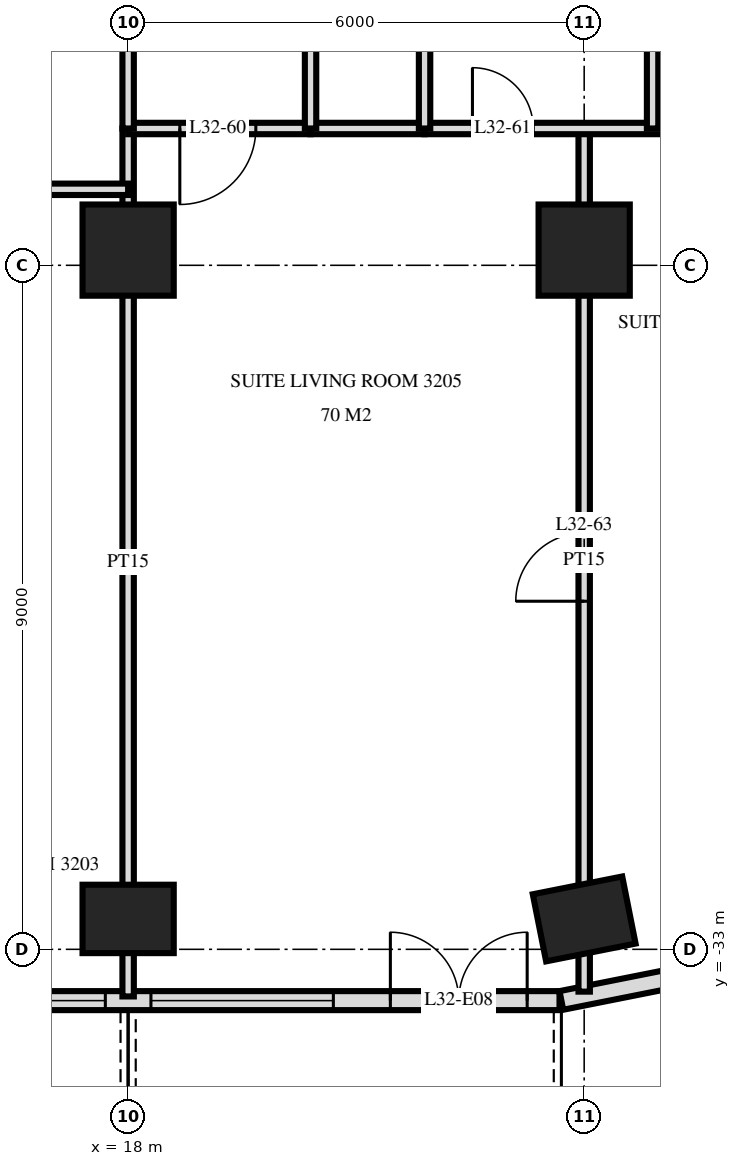
"""IFC4 building model, lengths in metres.
Left out: names, types, materials, properties, quantities, classifications, styles, units other than length and angle.
Written with IfcOpenShell. Run it as: python <this file> out.ifc"""

import sys

from ifc_helpers import new_model, si_unit, direction, frame, frame_2d, origin, origin_2d, place, context, subcontext, project, spatial, rectangle, extrude, element, fill, save


model = new_model("IFC4")
c1 = context("Model", 3, precision=1e-05, world=origin(), true_north=direction((0.0, 1.0)))
c2 = subcontext(c1, "Body", "Model", "MODEL_VIEW")
j1 = project(units=[si_unit("LENGTHUNIT", "METRE"), si_unit("PLANEANGLEUNIT", "RADIAN")], contexts=[c1])
p1 = place(None, origin())
s1 = spatial("IfcSite", under=j1, at=p1, CompositionType="ELEMENT")
p2 = place(p1, origin())
s2 = spatial("IfcBuilding", under=s1, at=p2, CompositionType="ELEMENT")
p3 = place(p2, frame((0.0, 0.0, 127.2)))
s3 = spatial("IfcBuildingStorey", under=s2, at=p3, CompositionType="ELEMENT", Elevation=127.2)
p4 = place(p3, frame((18.0, -32.6, 0.0), z_axis=(0.0, 0.0, 1.0), x_axis=(1.0, 0.0, 0.0)))
e1 = element("IfcColumn", 1, at=p4, inside=s3, PredefinedType="COLUMN", context=c2, shape_type="SweptSolid", body=[
    extrude(rectangle(XDim=1.2, YDim=0.9, at=origin_2d()), origin(), (0.0, 0.0, 1.0), 3.6),
])
p5 = place(p3, frame((18.0, -23.8, 0.0), z_axis=(0.0, 0.0, 1.0), x_axis=(1.0, 0.0, 0.0)))
e2 = element("IfcColumn", 2, at=p5, inside=s3, PredefinedType="COLUMN", context=c2, shape_type="SweptSolid", body=[
    extrude(rectangle(XDim=1.2, YDim=1.2, at=origin_2d()), origin(), (0.0, 0.0, 1.0), 3.6),
])
p6 = place(p3, frame((24.0, -32.6, 0.0), z_axis=(0.0, 0.0, 1.0), x_axis=(0.980792089743, 0.195056086032, 0.0)))
e3 = element("IfcColumn", 3, at=p6, inside=s3, PredefinedType="COLUMN", context=c2, shape_type="SweptSolid", body=[
    extrude(rectangle(XDim=1.2, YDim=0.9, at=origin_2d()), origin(), (0.0, 0.0, 1.0), 3.6),
])
p7 = place(p3, frame((24.0, -23.8, 0.0), z_axis=(0.0, 0.0, 1.0), x_axis=(1.0, 0.0, 0.0)))
e4 = element("IfcColumn", 4, at=p7, inside=s3, PredefinedType="COLUMN", context=c2, shape_type="SweptSolid", body=[
    extrude(rectangle(XDim=1.2, YDim=1.2, at=origin_2d()), origin(), (0.0, 0.0, 1.0), 3.6),
])
p8 = place(p3, frame((-23.675, -33.675, 0.0), z_axis=(0.0, 0.0, 1.0), x_axis=(1.0, 0.0, 0.0)))
e5 = element("IfcWall", 5, at=p8, inside=s3, PredefinedType="SOLIDWALL", context=c2, shape_type="SweptSolid", body=[
    extrude(rectangle(XDim=47.351, YDim=0.25, at=frame_2d((23.675, 0.0))), origin(), (0.0, 0.0, 1.0), 3.32),
])
p9 = place(p8, frame((3.425, 0.0, 0.0)))
e6 = element("IfcOpeningElement", 6, at=p9, cuts=e5, PredefinedType="OPENING", context=c2, shape_type="SweptSolid", body=[
    extrude(rectangle(XDim=1.8, YDim=2.4, at=frame_2d((0.9, 1.2))), frame((0.0, 0.135, 0.0), z_axis=(0.0, -1.0, 0.0), x_axis=(1.0, 0.0, 0.0)), (0.0, 0.0, 1.0), 0.27),
])
p10 = place(p8, frame((6.275, 0.0, 0.0)))
e7 = element("IfcOpeningElement", 7, at=p10, cuts=e5, PredefinedType="OPENING", context=c2, shape_type="SweptSolid", body=[
    extrude(rectangle(XDim=1.8, YDim=2.4, at=frame_2d((0.9, 1.2))), frame((0.0, 0.135, 0.0), z_axis=(0.0, -1.0, 0.0), x_axis=(1.0, 0.0, 0.0)), (0.0, 0.0, 1.0), 0.27),
])
p11 = place(p8, frame((8.975, 0.0, 0.3)))
e8 = element("IfcOpeningElement", 8, at=p11, cuts=e5, PredefinedType="OPENING", context=c2, shape_type="SweptSolid", body=[
    extrude(rectangle(XDim=2.4, YDim=2.1, at=frame_2d((1.2, 1.05))), frame((0.0, 0.135, 0.0), z_axis=(0.0, -1.0, 0.0), x_axis=(1.0, 0.0, 0.0)), (0.0, 0.0, 1.0), 0.27),
])
p12 = place(p8, frame((12.275, 0.0, 0.0)))
e9 = element("IfcOpeningElement", 9, at=p12, cuts=e5, PredefinedType="OPENING", context=c2, shape_type="SweptSolid", body=[
    extrude(rectangle(XDim=1.8, YDim=2.4, at=frame_2d((0.9, 1.2))), frame((0.0, 0.135, 0.0), z_axis=(0.0, -1.0, 0.0), x_axis=(1.0, 0.0, 0.0)), (0.0, 0.0, 1.0), 0.27),
])
p13 = place(p8, frame((14.975, 0.0, 0.3)))
e10 = element("IfcOpeningElement", 10, at=p13, cuts=e5, PredefinedType="OPENING", context=c2, shape_type="SweptSolid", body=[
    extrude(rectangle(XDim=2.4, YDim=2.1, at=frame_2d((1.2, 1.05))), frame((0.0, 0.135, 0.0), z_axis=(0.0, -1.0, 0.0), x_axis=(1.0, 0.0, 0.0)), (0.0, 0.0, 1.0), 0.27),
])
p14 = place(p8, frame((17.975, 0.0, 0.3)))
e11 = element("IfcOpeningElement", 11, at=p14, cuts=e5, PredefinedType="OPENING", context=c2, shape_type="SweptSolid", body=[
    extrude(rectangle(XDim=2.4, YDim=2.1, at=frame_2d((1.2, 1.05))), frame((0.0, 0.135, 0.0), z_axis=(0.0, -1.0, 0.0), x_axis=(1.0, 0.0, 0.0)), (0.0, 0.0, 1.0), 0.27),
])
p15 = place(p8, frame((21.275, 0.0, 0.0)))
e12 = element("IfcOpeningElement", 12, at=p15, cuts=e5, PredefinedType="OPENING", context=c2, shape_type="SweptSolid", body=[
    extrude(rectangle(XDim=1.8, YDim=2.4, at=frame_2d((0.9, 1.2))), frame((0.0, 0.135, 0.0), z_axis=(0.0, -1.0, 0.0), x_axis=(1.0, 0.0, 0.0)), (0.0, 0.0, 1.0), 0.27),
])
p16 = place(p8, frame((24.275, 0.0, 0.0)))
e13 = element("IfcOpeningElement", 13, at=p16, cuts=e5, PredefinedType="OPENING", context=c2, shape_type="SweptSolid", body=[
    extrude(rectangle(XDim=1.8, YDim=2.4, at=frame_2d((0.9, 1.2))), frame((0.0, 0.135, 0.0), z_axis=(0.0, -1.0, 0.0), x_axis=(1.0, 0.0, 0.0)), (0.0, 0.0, 1.0), 0.27),
])
p17 = place(p8, frame((26.975, 0.0, 0.3)))
e14 = element("IfcOpeningElement", 14, at=p17, cuts=e5, PredefinedType="OPENING", context=c2, shape_type="SweptSolid", body=[
    extrude(rectangle(XDim=2.4, YDim=2.1, at=frame_2d((1.2, 1.05))), frame((0.0, 0.135, 0.0), z_axis=(0.0, -1.0, 0.0), x_axis=(1.0, 0.0, 0.0)), (0.0, 0.0, 1.0), 0.27),
])
p18 = place(p8, frame((30.275, 0.0, 0.0)))
e15 = element("IfcOpeningElement", 15, at=p18, cuts=e5, PredefinedType="OPENING", context=c2, shape_type="SweptSolid", body=[
    extrude(rectangle(XDim=1.8, YDim=2.4, at=frame_2d((0.9, 1.2))), frame((0.0, 0.135, 0.0), z_axis=(0.0, -1.0, 0.0), x_axis=(1.0, 0.0, 0.0)), (0.0, 0.0, 1.0), 0.27),
])
p19 = place(p8, frame((32.975, 0.0, 0.3)))
e16 = element("IfcOpeningElement", 16, at=p19, cuts=e5, PredefinedType="OPENING", context=c2, shape_type="SweptSolid", body=[
    extrude(rectangle(XDim=2.4, YDim=2.1, at=frame_2d((1.2, 1.05))), frame((0.0, 0.135, 0.0), z_axis=(0.0, -1.0, 0.0), x_axis=(1.0, 0.0, 0.0)), (0.0, 0.0, 1.0), 0.27),
])
p20 = place(p8, frame((36.275, 0.0, 0.0)))
e17 = element("IfcOpeningElement", 17, at=p20, cuts=e5, PredefinedType="OPENING", context=c2, shape_type="SweptSolid", body=[
    extrude(rectangle(XDim=1.8, YDim=2.4, at=frame_2d((0.9, 1.2))), frame((0.0, 0.135, 0.0), z_axis=(0.0, -1.0, 0.0), x_axis=(1.0, 0.0, 0.0)), (0.0, 0.0, 1.0), 0.27),
])
p21 = place(p8, frame((38.975, 0.0, 0.3)))
e18 = element("IfcOpeningElement", 18, at=p21, cuts=e5, PredefinedType="OPENING", context=c2, shape_type="SweptSolid", body=[
    extrude(rectangle(XDim=2.4, YDim=2.1, at=frame_2d((1.2, 1.05))), frame((0.0, 0.135, 0.0), z_axis=(0.0, -1.0, 0.0), x_axis=(1.0, 0.0, 0.0)), (0.0, 0.0, 1.0), 0.27),
])
p22 = place(p8, frame((41.975, 0.0, 0.3)))
e19 = element("IfcOpeningElement", 19, at=p22, cuts=e5, PredefinedType="OPENING", context=c2, shape_type="SweptSolid", body=[
    extrude(rectangle(XDim=2.4, YDim=2.1, at=frame_2d((1.2, 1.05))), frame((0.0, 0.135, 0.0), z_axis=(0.0, -1.0, 0.0), x_axis=(1.0, 0.0, 0.0)), (0.0, 0.0, 1.0), 0.27),
])
p23 = place(p8, frame((45.125, 0.0, 0.0)))
e20 = element("IfcOpeningElement", 20, at=p23, cuts=e5, PredefinedType="OPENING", context=c2, shape_type="SweptSolid", body=[
    extrude(rectangle(XDim=1.8, YDim=2.4, at=frame_2d((0.9, 1.2))), frame((0.0, 0.135, 0.0), z_axis=(0.0, -1.0, 0.0), x_axis=(1.0, 0.0, 0.0)), (0.0, 0.0, 1.0), 0.27),
])
p24 = place(p3, frame((23.7, -33.673, 0.0), z_axis=(0.0, 0.0, 1.0), x_axis=(0.980775640221, 0.19513878023, 0.0)))
e21 = element("IfcWall", 21, at=p24, inside=s3, PredefinedType="SOLIDWALL", context=c2, shape_type="SweptSolid", body=[
    extrude(rectangle(XDim=1.681, YDim=0.25, at=frame_2d((0.841, 0.0))), origin(), (0.0, 0.0, 1.0), 3.32),
])
p25 = place(p3, frame((24.9, -22.2, 0.0), z_axis=(0.0, 0.0, 1.0), x_axis=(0.0, 1.0, 0.0)))
e22 = element("IfcWall", 22, at=p25, inside=s3, PredefinedType="PARTITIONING", context=c2, shape_type="SweptSolid", body=[
    extrude(rectangle(XDim=4.2, YDim=0.15, at=frame_2d((2.1, 0.0))), origin(), (0.0, 0.0, 1.0), 3.32),
])
p26 = place(p3, frame((24.0, -33.557, 0.0), z_axis=(0.0, 0.0, 1.0), x_axis=(0.0, 1.0, 0.0)))
e23 = element("IfcWall", 23, at=p26, inside=s3, PredefinedType="PARTITIONING", context=c2, shape_type="SweptSolid", body=[
    extrude(rectangle(XDim=11.357, YDim=0.15, at=frame_2d((5.678, 0.0))), origin(), (0.0, 0.0, 1.0), 3.32),
])
p27 = place(p26, frame((5.137, 0.0, 0.0)))
e24 = element("IfcOpeningElement", 24, at=p27, cuts=e23, PredefinedType="OPENING", context=c2, shape_type="SweptSolid", body=[
    extrude(rectangle(XDim=0.9, YDim=2.1, at=frame_2d((0.45, 1.05))), frame((0.0, 0.085, 0.0), z_axis=(0.0, -1.0, 0.0), x_axis=(1.0, 0.0, 0.0)), (0.0, 0.0, 1.0), 0.17),
])
p28 = place(p3, frame((21.9, -22.2, 0.0), z_axis=(0.0, 0.0, 1.0), x_axis=(0.0, 1.0, 0.0)))
e25 = element("IfcWall", 25, at=p28, inside=s3, PredefinedType="PLUMBINGWALL", context=c2, shape_type="SweptSolid", body=[
    extrude(rectangle(XDim=4.2, YDim=0.15, at=frame_2d((2.1, 0.0))), origin(), (0.0, 0.0, 1.0), 3.32),
])
p29 = place(p3, frame((20.4, -22.2, 0.0), z_axis=(0.0, 0.0, 1.0), x_axis=(0.0, 1.0, 0.0)))
e26 = element("IfcWall", 26, at=p29, inside=s3, PredefinedType="PARTITIONING", context=c2, shape_type="SweptSolid", body=[
    extrude(rectangle(XDim=4.2, YDim=0.15, at=frame_2d((2.1, 0.0))), origin(), (0.0, 0.0, 1.0), 3.32),
])
p30 = place(p29, frame((1.6, 0.0, 0.0)))
e27 = element("IfcOpeningElement", 27, at=p30, cuts=e26, PredefinedType="OPENING", context=c2, shape_type="SweptSolid", body=[
    extrude(rectangle(XDim=1.0, YDim=2.1, at=frame_2d((0.5, 1.05))), frame((0.0, 0.085, 0.0), z_axis=(0.0, -1.0, 0.0), x_axis=(1.0, 0.0, 0.0)), (0.0, 0.0, 1.0), 0.17),
])
p31 = place(p3, frame((18.0, -22.2, 0.0), z_axis=(0.0, 0.0, 1.0), x_axis=(0.0, 1.0, 0.0)))
e28 = element("IfcWall", 28, at=p31, inside=s3, PredefinedType="PARTITIONING", context=c2, shape_type="SweptSolid", body=[
    extrude(rectangle(XDim=4.2, YDim=0.15, at=frame_2d((2.1, 0.0))), origin(), (0.0, 0.0, 1.0), 3.32),
])
p32 = place(p3, frame((18.0, -33.62, 0.0), z_axis=(0.0, 0.0, 1.0), x_axis=(0.0, 1.0, 0.0)))
e29 = element("IfcWall", 29, at=p32, inside=s3, PredefinedType="PARTITIONING", context=c2, shape_type="SweptSolid", body=[
    extrude(rectangle(XDim=11.42, YDim=0.15, at=frame_2d((5.71, 0.0))), origin(), (0.0, 0.0, 1.0), 3.32),
])
p33 = place(p3, frame((16.3, -23.0, 0.0), z_axis=(0.0, 0.0, 1.0), x_axis=(1.0, 0.0, 0.0)))
e30 = element("IfcWall", 30, at=p33, inside=s3, PredefinedType="PARTITIONING", context=c2, shape_type="SweptSolid", body=[
    extrude(rectangle(XDim=1.7, YDim=0.15, at=frame_2d((0.85, 0.0))), origin(), (0.0, 0.0, 1.0), 3.32),
])
p34 = place(p3, frame((18.0, -22.2, 0.0), z_axis=(0.0, 0.0, 1.0), x_axis=(1.0, 0.0, 0.0)))
e31 = element("IfcWall", 31, at=p34, inside=s3, PredefinedType="PARTITIONING", context=c2, shape_type="SweptSolid", body=[
    extrude(rectangle(XDim=2.4, YDim=0.15, at=frame_2d((1.2, 0.0))), origin(), (0.0, 0.0, 1.0), 3.32),
])
p35 = place(p34, frame((0.68, 0.0, 0.0)))
e32 = element("IfcOpeningElement", 32, at=p35, cuts=e31, PredefinedType="OPENING", context=c2, shape_type="SweptSolid", body=[
    extrude(rectangle(XDim=1.0, YDim=2.1, at=frame_2d((0.5, 1.05))), frame((0.0, 0.085, 0.0), z_axis=(0.0, -1.0, 0.0), x_axis=(1.0, 0.0, 0.0)), (0.0, 0.0, 1.0), 0.17),
])
p36 = place(p3, frame((21.9, -22.2, 0.0), z_axis=(0.0, 0.0, 1.0), x_axis=(1.0, 0.0, 0.0)))
e33 = element("IfcWall", 33, at=p36, inside=s3, PredefinedType="PARTITIONING", context=c2, shape_type="SweptSolid", body=[
    extrude(rectangle(XDim=6.12, YDim=0.15, at=frame_2d((3.06, 0.0))), origin(), (0.0, 0.0, 1.0), 3.32),
])
p37 = place(p36, frame((0.63, 0.0, 0.0)))
e34 = element("IfcOpeningElement", 34, at=p37, cuts=e33, PredefinedType="OPENING", context=c2, shape_type="SweptSolid", body=[
    extrude(rectangle(XDim=0.8, YDim=2.1, at=frame_2d((0.4, 1.05))), frame((0.0, 0.085, 0.0), z_axis=(0.0, -1.0, 0.0), x_axis=(1.0, 0.0, 0.0)), (0.0, 0.0, 1.0), 0.17),
])
p38 = place(p36, frame((3.73, 0.0, 0.0)))
e35 = element("IfcOpeningElement", 35, at=p38, cuts=e33, PredefinedType="OPENING", context=c2, shape_type="SweptSolid", body=[
    extrude(rectangle(XDim=0.9, YDim=2.1, at=frame_2d((0.45, 1.05))), frame((0.0, 0.085, 0.0), z_axis=(0.0, -1.0, 0.0), x_axis=(1.0, 0.0, 0.0)), (0.0, 0.0, 1.0), 0.17),
])
p39 = place(p3, frame((20.4, -22.2, 0.0), z_axis=(0.0, 0.0, 1.0), x_axis=(1.0, 0.0, 0.0)))
e36 = element("IfcWall", 36, at=p39, inside=s3, PredefinedType="PLUMBINGWALL", context=c2, shape_type="SweptSolid", body=[
    extrude(rectangle(XDim=1.5, YDim=0.15, at=frame_2d((0.75, 0.0))), origin(), (0.0, 0.0, 1.0), 3.32),
])
p40 = place(p21, origin())
e37 = element("IfcWindow", 37, at=p40, inside=s3, PartitioningType="SINGLE_PANEL", PredefinedType="WINDOW", context=c2, shape_type="SweptSolid", body=[
    extrude(rectangle(XDim=2.4, YDim=2.1, at=frame_2d((1.2, 1.05))), frame((0.0, 0.03, 0.0), z_axis=(0.0, -1.0, 0.0), x_axis=(1.0, 0.0, 0.0)), (0.0, 0.0, 1.0), 0.06),
])
fill(e18, e37)
p41 = place(p22, origin())
e38 = element("IfcWindow", 38, at=p41, inside=s3, PartitioningType="SINGLE_PANEL", PredefinedType="WINDOW", context=c2, shape_type="SweptSolid", body=[
    extrude(rectangle(XDim=2.4, YDim=2.1, at=frame_2d((1.2, 1.05))), frame((0.0, 0.03, 0.0), z_axis=(0.0, -1.0, 0.0), x_axis=(1.0, 0.0, 0.0)), (0.0, 0.0, 1.0), 0.06),
])
fill(e19, e38)
p42 = place(p23, origin())
e39 = element("IfcDoor", 39, at=p42, inside=s3, OperationType="DOUBLE_DOOR_SINGLE_SWING", PredefinedType="DOOR", context=c2, shape_type="SweptSolid", body=[
    extrude(rectangle(XDim=1.8, YDim=2.4, at=frame_2d((0.9, 1.2))), frame((0.0, 0.025, 0.0), z_axis=(0.0, -1.0, 0.0), x_axis=(1.0, 0.0, 0.0)), (0.0, 0.0, 1.0), 0.05),
])
fill(e20, e39)
p43 = place(p35, frame((0.5, 0.0, 0.0), z_axis=(0.0, 0.0, 1.0), x_axis=(-1.0, 0.0, 0.0)))
e40 = element("IfcDoor", 40, at=p43, inside=s3, OperationType="SINGLE_SWING_LEFT", PredefinedType="DOOR", context=c2, shape_type="SweptSolid", body=[
    extrude(rectangle(XDim=1.0, YDim=2.1, at=frame_2d((0.0, 1.05))), frame((0.0, -0.025, 0.0), z_axis=(0.0, 1.0, 0.0), x_axis=(-1.0, 0.0, 0.0)), (0.0, 0.0, 1.0), 0.05),
])
fill(e32, e40)
p44 = place(p37, origin())
e41 = element("IfcDoor", 41, at=p44, inside=s3, OperationType="SINGLE_SWING_RIGHT", PredefinedType="DOOR", context=c2, shape_type="SweptSolid", body=[
    extrude(rectangle(XDim=0.8, YDim=2.1, at=frame_2d((0.4, 1.05))), frame((0.0, 0.025, 0.0), z_axis=(0.0, -1.0, 0.0), x_axis=(1.0, 0.0, 0.0)), (0.0, 0.0, 1.0), 0.05),
])
fill(e34, e41)
p45 = place(p27, origin())
e42 = element("IfcDoor", 42, at=p45, inside=s3, OperationType="SINGLE_SWING_RIGHT", PredefinedType="DOOR", context=c2, shape_type="SweptSolid", body=[
    extrude(rectangle(XDim=0.9, YDim=2.1, at=frame_2d((0.45, 1.05))), frame((0.0, 0.025, 0.0), z_axis=(0.0, -1.0, 0.0), x_axis=(1.0, 0.0, 0.0)), (0.0, 0.0, 1.0), 0.05),
])
fill(e24, e42)
save(model, sys.argv[1])
